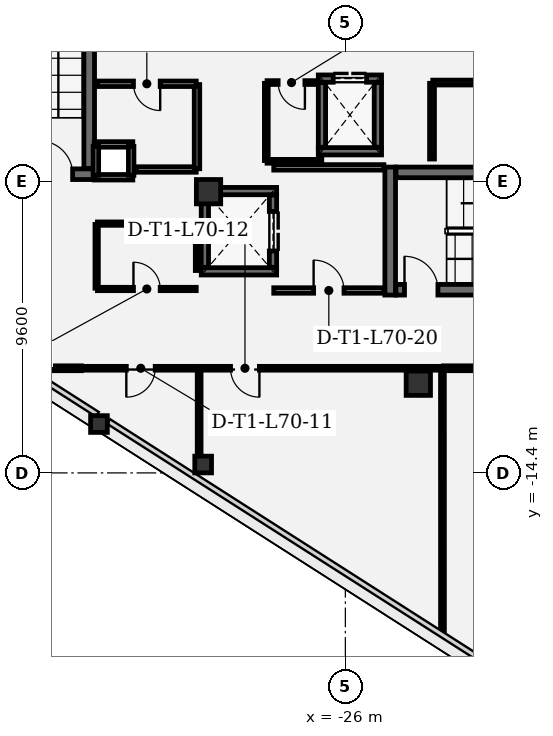
"""IFC4 building model, lengths in metres.
Left out: names, types, materials, properties, quantities, classifications, styles, units other than length and angle.
Written with IfcOpenShell. Run it as: python <this file> out.ifc"""

import sys

from ifc_helpers import new_model, si_unit, direction, frame, frame_2d, origin, origin_2d, place, context, subcontext, project, spatial, rectangle, extrude, element, fill, save


model = new_model("IFC4")
c1 = context("Model", 3, precision=1e-05, world=origin(), true_north=direction((0.0, 1.0)))
c2 = subcontext(c1, "Body", "Model", "MODEL_VIEW")
j1 = project(units=[si_unit("LENGTHUNIT", "METRE"), si_unit("PLANEANGLEUNIT", "RADIAN")], contexts=[c1])
p1 = place(None, origin())
s1 = spatial("IfcSite", under=j1, at=p1, CompositionType="ELEMENT")
p2 = place(p1, origin())
s2 = spatial("IfcBuilding", under=s1, at=p2, CompositionType="ELEMENT")
p3 = place(p2, frame((0.0, 0.0, 301.8)))
s3 = spatial("IfcBuildingStorey", under=s2, at=p3, CompositionType="ELEMENT", Elevation=301.8)
for number, where, z_axis, x_axis in (
    (1, (-23.6, -11.45, 0.0), (0.0, 0.0, 1.0), (1.0, 0.0, 0.0)),
    (2, (-30.5, -5.15, 0.0), (0.0, 0.0, 1.0), (1.0, 0.0, 0.0)),
):
    element("IfcColumn", number, at=place(p3, frame(where, z_axis=z_axis, x_axis=x_axis)), inside=s3, PredefinedType="COLUMN", context=c2, shape_type="SweptSolid", body=[
        extrude(rectangle(XDim=0.8, YDim=0.8, at=origin_2d()), origin(), (0.0, 0.0, 1.0), 4.2),
    ])
for number, where, z_axis, x_axis in (
    (3, (-34.104, -12.792, 0.0), (0.0, 0.0, 1.0), (1.0, 0.0, 0.0)),
    (4, (-30.677, -14.124, 0.0), (0.0, 0.0, 1.0), (1.0, 0.0, 0.0)),
):
    element("IfcColumn", number, at=place(p3, frame(where, z_axis=z_axis, x_axis=x_axis)), inside=s3, PredefinedType="COLUMN", context=c2, shape_type="SweptSolid", body=[
        extrude(rectangle(XDim=0.55, YDim=0.55, at=origin_2d()), origin(), (0.0, 0.0, 1.0), 4.2),
    ])
p4 = place(p3, frame((-24.525, -4.34, 0.0), z_axis=(0.0, 0.0, 1.0), x_axis=(0.0, -1.0, 0.0)))
e5 = element("IfcWall", 5, at=p4, inside=s3, PredefinedType="SHEAR", context=c2, shape_type="SweptSolid", body=[
    extrude(rectangle(XDim=4.21, YDim=0.35, at=frame_2d((2.105, 0.0))), origin(), (0.0, 0.0, 1.0), 3.91),
])
p5 = place(p3, frame((-24.335, -8.375, 0.0), z_axis=(0.0, 0.0, 1.0), x_axis=(1.0, 0.0, 0.0)))
e6 = element("IfcWall", 6, at=p5, inside=s3, PredefinedType="SHEAR", context=c2, shape_type="SweptSolid", body=[
    extrude(rectangle(XDim=8.12, YDim=0.35, at=frame_2d((4.06, 0.0))), origin(), (0.0, 0.0, 1.0), 3.91),
])
p6 = place(p5, frame((0.28, 0.0, 0.0)))
e7 = element("IfcOpeningElement", 7, at=p6, cuts=e6, PredefinedType="OPENING", context=c2, shape_type="SweptSolid", body=[
    extrude(rectangle(XDim=1.1, YDim=2.2, at=frame_2d((0.55, 1.1))), frame((0.0, 0.185, 0.0), z_axis=(0.0, -1.0, 0.0), x_axis=(1.0, 0.0, 0.0)), (0.0, 0.0, 1.0), 0.37),
])
p7 = place(p3, frame((-16.215, -4.515, 0.0), z_axis=(0.0, 0.0, 1.0), x_axis=(-1.0, 0.0, 0.0)))
e8 = element("IfcWall", 8, at=p7, inside=s3, PredefinedType="SHEAR", context=c2, shape_type="SweptSolid", body=[
    extrude(rectangle(XDim=8.12, YDim=0.35, at=frame_2d((4.06, 0.0))), origin(), (0.0, 0.0, 1.0), 3.91),
])
p8 = place(p3, frame((-38.46, -4.575, 0.0), z_axis=(0.0, 0.0, 1.0), x_axis=(1.0, 0.0, 0.0)))
e9 = element("IfcWall", 9, at=p8, inside=s3, PredefinedType="SHEAR", context=c2, shape_type="SweptSolid", body=[
    extrude(rectangle(XDim=4.21, YDim=0.35, at=frame_2d((2.105, 0.0))), origin(), (0.0, 0.0, 1.0), 3.91),
])
p9 = place(p8, frame((2.39, 0.0, 0.0)))
e10 = element("IfcOpeningElement", 10, at=p9, cuts=e9, PredefinedType="OPENING", context=c2, shape_type="SweptSolid", body=[
    extrude(rectangle(XDim=1.1, YDim=2.2, at=frame_2d((0.55, 1.1))), frame((0.0, 0.185, 0.0), z_axis=(0.0, -1.0, 0.0), x_axis=(1.0, 0.0, 0.0)), (0.0, 0.0, 1.0), 0.37),
])
p10 = place(p3, frame((-34.425, -4.385, 0.0), z_axis=(0.0, 0.0, 1.0), x_axis=(0.0, 1.0, 0.0)))
e11 = element("IfcWall", 11, at=p10, inside=s3, PredefinedType="SHEAR", context=c2, shape_type="SweptSolid", body=[
    extrude(rectangle(XDim=8.77, YDim=0.35, at=frame_2d((4.385, 0.0))), origin(), (0.0, 0.0, 1.0), 3.91),
])
for number, where, z_axis, x_axis in (
    (12, (-28.26, -7.77, 0.0), (0.0, 0.0, 1.0), (-1.0, 0.0, 0.0)),
    (13, (-30.74, -5.13, 0.0), (0.0, 0.0, 1.0), (1.0, 0.0, 0.0)),
):
    element("IfcWall", number, at=place(p3, frame(where, z_axis=z_axis, x_axis=x_axis)), inside=s3, PredefinedType="SHEAR", context=c2, shape_type="SweptSolid", body=[
        extrude(rectangle(XDim=2.48, YDim=0.24, at=frame_2d((1.24, 0.0))), origin(), (0.0, 0.0, 1.0), 3.91),
    ])
p11 = place(p3, frame((-30.62, -7.638, 0.0), z_axis=(0.0, 0.0, 1.0), x_axis=(0.0, 1.0, 0.0)))
e14 = element("IfcWall", 14, at=p11, inside=s3, PredefinedType="SHEAR", context=c2, shape_type="SweptSolid", body=[
    extrude(rectangle(XDim=2.376, YDim=0.24, at=frame_2d((1.188, 0.0))), origin(), (0.0, 0.0, 1.0), 3.91),
])
p12 = place(p3, frame((-28.38, -5.262, 0.0), z_axis=(0.0, 0.0, 1.0), x_axis=(0.0, -1.0, 0.0)))
e15 = element("IfcWall", 15, at=p12, inside=s3, PredefinedType="SHEAR", context=c2, shape_type="SweptSolid", body=[
    extrude(rectangle(XDim=2.376, YDim=0.24, at=frame_2d((1.188, 0.0))), origin(), (0.0, 0.0, 1.0), 3.91),
])
p13 = place(p12, frame((0.538, 0.0, 0.0)))
e16 = element("IfcOpeningElement", 16, at=p13, cuts=e15, PredefinedType="OPENING", context=c2, shape_type="SweptSolid", body=[
    extrude(rectangle(XDim=1.3, YDim=2.3, at=frame_2d((0.65, 1.15))), frame((0.0, 0.13, 0.0), z_axis=(0.0, -1.0, 0.0), x_axis=(1.0, 0.0, 0.0)), (0.0, 0.0, 1.0), 0.26),
])
p14 = place(p3, frame((-24.81, -3.82, 0.0), z_axis=(0.0, 0.0, 1.0), x_axis=(-1.0, 0.0, 0.0)))
e17 = element("IfcWall", 17, at=p14, inside=s3, PredefinedType="SHEAR", context=c2, shape_type="SweptSolid", body=[
    extrude(rectangle(XDim=2.08, YDim=0.24, at=frame_2d((1.04, 0.0))), origin(), (0.0, 0.0, 1.0), 3.91),
])
p15 = place(p3, frame((-26.89, -1.43, 0.0), z_axis=(0.0, 0.0, 1.0), x_axis=(1.0, 0.0, 0.0)))
e18 = element("IfcWall", 18, at=p15, inside=s3, PredefinedType="SHEAR", context=c2, shape_type="SweptSolid", body=[
    extrude(rectangle(XDim=2.08, YDim=0.24, at=frame_2d((1.04, 0.0))), origin(), (0.0, 0.0, 1.0), 3.91),
])
p16 = place(p15, frame((0.49, 0.0, 0.0)))
e19 = element("IfcOpeningElement", 19, at=p16, cuts=e18, PredefinedType="OPENING", context=c2, shape_type="SweptSolid", body=[
    extrude(rectangle(XDim=1.1, YDim=2.2, at=frame_2d((0.55, 1.1))), frame((0.0, 0.13, 0.0), z_axis=(0.0, -1.0, 0.0), x_axis=(1.0, 0.0, 0.0)), (0.0, 0.0, 1.0), 0.26),
])
for number, where, z_axis, x_axis in (
    (20, (-26.77, -3.688, 0.0), (0.0, 0.0, 1.0), (0.0, 1.0, 0.0)),
    (21, (-24.93, -1.562, 0.0), (0.0, 0.0, 1.0), (0.0, -1.0, 0.0)),
):
    element("IfcWall", number, at=place(p3, frame(where, z_axis=z_axis, x_axis=x_axis)), inside=s3, PredefinedType="SHEAR", context=c2, shape_type="SweptSolid", body=[
        extrude(rectangle(XDim=2.126, YDim=0.24, at=frame_2d((1.063, 0.0))), origin(), (0.0, 0.0, 1.0), 3.91),
    ])
for number, where, z_axis, x_axis in (
    (22, (-32.99, -4.675, 0.0), (0.0, 0.0, 1.0), (-1.0, 0.0, 0.0)),
    (23, (-34.26, -3.595, 0.0), (0.0, 0.0, 1.0), (1.0, 0.0, 0.0)),
):
    element("IfcWall", number, at=place(p3, frame(where, z_axis=z_axis, x_axis=x_axis)), inside=s3, PredefinedType="PARTITIONING", context=c2, shape_type="SweptSolid", body=[
        extrude(rectangle(XDim=1.27, YDim=0.18, at=frame_2d((0.635, 0.0))), origin(), (0.0, 0.0, 1.0), 3.91),
    ])
for number, where, z_axis, x_axis in (
    (24, (-34.205, -4.61, 0.0), (0.0, 0.0, 1.0), (0.0, 1.0, 0.0)),
    (25, (-33.045, -3.66, 0.0), (0.0, 0.0, 1.0), (0.0, -1.0, 0.0)),
):
    element("IfcWall", number, at=place(p3, frame(where, z_axis=z_axis, x_axis=x_axis)), inside=s3, PredefinedType="PARTITIONING", context=c2, shape_type="SweptSolid", body=[
        extrude(rectangle(XDim=0.95, YDim=0.18, at=frame_2d((0.475, 0.0))), origin(), (0.0, 0.0, 1.0), 3.91),
    ])
p17 = place(p3, frame((-28.355, -8.4, 0.0), z_axis=(0.0, 0.0, 1.0), x_axis=(1.0, 0.0, 0.0)))
e26 = element("IfcWall", 26, at=p17, inside=s3, PredefinedType="PARTITIONING", context=c2, shape_type="SweptSolid", body=[
    extrude(rectangle(XDim=3.622, YDim=0.18, at=frame_2d((1.811, 0.0))), origin(), (0.0, 0.0, 1.0), 3.529),
])
p18 = place(p17, frame((1.311, 0.0, 0.0)))
e27 = element("IfcOpeningElement", 27, at=p18, cuts=e26, PredefinedType="OPENING", context=c2, shape_type="SweptSolid", body=[
    extrude(rectangle(XDim=1.0, YDim=2.15, at=frame_2d((0.5, 1.075))), frame((0.0, 0.1, 0.0), z_axis=(0.0, -1.0, 0.0), x_axis=(1.0, 0.0, 0.0)), (0.0, 0.0, 1.0), 0.2),
])
p19 = place(p3, frame((-24.733, -4.35, 0.0), z_axis=(0.0, 0.0, 1.0), x_axis=(-1.0, 0.0, 0.0)))
e28 = element("IfcWall", 28, at=p19, inside=s3, PredefinedType="PARTITIONING", context=c2, shape_type="SweptSolid", body=[
    extrude(rectangle(XDim=3.622, YDim=0.18, at=frame_2d((1.811, 0.0))), origin(), (0.0, 0.0, 1.0), 3.91),
])
p20 = place(p3, frame((-34.18, -6.225, 0.0), z_axis=(0.0, 0.0, 1.0), x_axis=(0.0, -1.0, 0.0)))
e29 = element("IfcWall", 29, at=p20, inside=s3, PredefinedType="PARTITIONING", context=c2, shape_type="SweptSolid", body=[
    extrude(rectangle(XDim=2.1, YDim=0.11, at=frame_2d((1.05, 0.0))), origin(), (0.0, 0.0, 1.0), 3.91),
])
p21 = place(p3, frame((-34.155, -8.35, 0.0), z_axis=(0.0, 0.0, 1.0), x_axis=(1.0, 0.0, 0.0)))
e30 = element("IfcWall", 30, at=p21, inside=s3, PredefinedType="PARTITIONING", context=c2, shape_type="SweptSolid", body=[
    extrude(rectangle(XDim=3.25, YDim=0.11, at=frame_2d((1.625, 0.0))), origin(), (0.0, 0.0, 1.0), 3.13),
])
p22 = place(p21, frame((1.185, 0.0, 0.0)))
e31 = element("IfcOpeningElement", 31, at=p22, cuts=e30, PredefinedType="OPENING", context=c2, shape_type="SweptSolid", body=[
    extrude(rectangle(XDim=0.88, YDim=2.1, at=frame_2d((0.44, 1.05))), frame((0.0, 0.065, 0.0), z_axis=(0.0, -1.0, 0.0), x_axis=(1.0, 0.0, 0.0)), (0.0, 0.0, 1.0), 0.13),
])
p23 = place(p3, frame((-30.88, -7.743, 0.0), z_axis=(0.0, 0.0, 1.0), x_axis=(0.0, 1.0, 0.0)))
e32 = element("IfcWall", 32, at=p23, inside=s3, PredefinedType="PARTITIONING", context=c2, shape_type="SweptSolid", body=[
    extrude(rectangle(XDim=1.518, YDim=0.11, at=frame_2d((0.759, 0.0))), origin(), (0.0, 0.0, 1.0), 3.91),
])
p24 = place(p3, frame((-30.905, -6.2, 0.0), z_axis=(0.0, 0.0, 1.0), x_axis=(-1.0, 0.0, 0.0)))
e33 = element("IfcWall", 33, at=p24, inside=s3, PredefinedType="PARTITIONING", context=c2, shape_type="SweptSolid", body=[
    extrude(rectangle(XDim=3.25, YDim=0.11, at=frame_2d((1.625, 0.0))), origin(), (0.0, 0.0, 1.0), 3.529),
])
p25 = place(p3, frame((-23.15, -1.585, 0.0), z_axis=(0.0, 0.0, 1.0), x_axis=(0.0, -1.0, 0.0)))
e34 = element("IfcWall", 34, at=p25, inside=s3, PredefinedType="PARTITIONING", context=c2, shape_type="SweptSolid", body=[
    extrude(rectangle(XDim=2.49, YDim=0.16, at=frame_2d((1.245, 0.0))), origin(), (0.0, 0.0, 1.0), 3.91),
])
p26 = place(p3, frame((-16.025, -1.56, 0.0), z_axis=(0.0, 0.0, 1.0), x_axis=(-1.0, 0.0, 0.0)))
e35 = element("IfcWall", 35, at=p26, inside=s3, PredefinedType="PARTITIONING", context=c2, shape_type="SweptSolid", body=[
    extrude(rectangle(XDim=7.1, YDim=0.16, at=frame_2d((3.55, 0.0))), origin(), (0.0, 0.0, 1.0), 3.91),
])
p27 = place(p26, frame((3.0, 0.0, 0.0)))
e36 = element("IfcOpeningElement", 36, at=p27, cuts=e35, PredefinedType="OPENING", context=c2, shape_type="SweptSolid", body=[
    extrude(rectangle(XDim=1.1, YDim=2.15, at=frame_2d((0.55, 1.075))), frame((0.0, 0.09, 0.0), z_axis=(0.0, -1.0, 0.0), x_axis=(1.0, 0.0, 0.0)), (0.0, 0.0, 1.0), 0.18),
])
p28 = place(p3, frame((-28.6, -1.585, 0.0), z_axis=(0.0, 0.0, 1.0), x_axis=(0.0, -1.0, 0.0)))
e37 = element("IfcWall", 37, at=p28, inside=s3, PredefinedType="PARTITIONING", context=c2, shape_type="SweptSolid", body=[
    extrude(rectangle(XDim=2.54, YDim=0.125, at=frame_2d((1.27, 0.0))), origin(), (0.0, 0.0, 1.0), 3.91),
])
p29 = place(p3, frame((-28.575, -4.15, 0.0), z_axis=(0.0, 0.0, 1.0), x_axis=(1.0, 0.0, 0.0)))
e38 = element("IfcWall", 38, at=p29, inside=s3, PredefinedType="PARTITIONING", context=c2, shape_type="SweptSolid", body=[
    extrude(rectangle(XDim=1.8, YDim=0.125, at=frame_2d((0.9, 0.0))), origin(), (0.0, 0.0, 1.0), 3.91),
])
p30 = place(p3, frame((-26.966, -1.56, 0.0), z_axis=(0.0, 0.0, 1.0), x_axis=(-1.0, 0.0, 0.0)))
e39 = element("IfcWall", 39, at=p30, inside=s3, PredefinedType="PARTITIONING", context=c2, shape_type="SweptSolid", body=[
    extrude(rectangle(XDim=1.609, YDim=0.125, at=frame_2d((0.805, 0.0))), origin(), (0.0, 0.0, 1.0), 3.91),
])
p31 = place(p30, frame((0.365, 0.0, 0.0)))
e40 = element("IfcOpeningElement", 40, at=p31, cuts=e39, PredefinedType="OPENING", context=c2, shape_type="SweptSolid", body=[
    extrude(rectangle(XDim=0.88, YDim=2.1, at=frame_2d((0.44, 1.05))), frame((0.0, 0.073, 0.0), z_axis=(0.0, -1.0, 0.0), x_axis=(1.0, 0.0, 0.0)), (0.0, 0.0, 1.0), 0.145),
])
p32 = place(p3, frame((-32.88, -4.42, 0.0), z_axis=(0.0, 0.0, 1.0), x_axis=(1.0, 0.0, 0.0)))
e41 = element("IfcWall", 41, at=p32, inside=s3, PredefinedType="PARTITIONING", context=c2, shape_type="SweptSolid", body=[
    extrude(rectangle(XDim=1.975, YDim=0.18, at=frame_2d((0.988, 0.0))), origin(), (0.0, 0.0, 1.0), 3.91),
])
p33 = place(p3, frame((-30.88, -4.395, 0.0), z_axis=(0.0, 0.0, 1.0), x_axis=(0.0, 1.0, 0.0)))
e42 = element("IfcWall", 42, at=p33, inside=s3, PredefinedType="PARTITIONING", context=c2, shape_type="SweptSolid", body=[
    extrude(rectangle(XDim=2.77, YDim=0.18, at=frame_2d((1.385, 0.0))), origin(), (0.0, 0.0, 1.0), 3.91),
])
p34 = place(p3, frame((-30.905, -1.6, 0.0), z_axis=(0.0, 0.0, 1.0), x_axis=(-1.0, 0.0, 0.0)))
e43 = element("IfcWall", 43, at=p34, inside=s3, PredefinedType="PARTITIONING", context=c2, shape_type="SweptSolid", body=[
    extrude(rectangle(XDim=3.25, YDim=0.18, at=frame_2d((1.625, 0.0))), origin(), (0.0, 0.0, 1.0), 3.91),
])
p35 = place(p34, frame((1.185, 0.0, 0.0)))
e44 = element("IfcOpeningElement", 44, at=p35, cuts=e43, PredefinedType="OPENING", context=c2, shape_type="SweptSolid", body=[
    extrude(rectangle(XDim=0.88, YDim=2.1, at=frame_2d((0.44, 1.05))), frame((0.0, 0.1, 0.0), z_axis=(0.0, -1.0, 0.0), x_axis=(1.0, 0.0, 0.0)), (0.0, 0.0, 1.0), 0.2),
])
p36 = place(p3, frame((-30.809, -13.784, 0.0), z_axis=(0.0, 0.0, 1.0), x_axis=(0.0, 1.0, 0.0)))
e45 = element("IfcWall", 45, at=p36, inside=s3, PredefinedType="PARTITIONING", context=c2, shape_type="SweptSolid", body=[
    extrude(rectangle(XDim=2.801, YDim=0.125, at=frame_2d((1.401, 0.0))), origin(), (0.0, 0.0, 1.0), 3.91),
])
p37 = place(p3, frame((-30.834, -10.958, 0.0), z_axis=(0.0, 0.0, 1.0), x_axis=(-1.0, 0.0, 0.0)))
e46 = element("IfcWall", 46, at=p37, inside=s3, PredefinedType="PARTITIONING", context=c2, shape_type="SweptSolid", body=[
    extrude(rectangle(XDim=3.791, YDim=0.125, at=frame_2d((1.896, 0.0))), origin(), (0.0, 0.0, 1.0), 3.91),
])
p38 = place(p37, frame((1.42, 0.0, 0.0)))
e47 = element("IfcOpeningElement", 47, at=p38, cuts=e46, PredefinedType="OPENING", context=c2, shape_type="SweptSolid", body=[
    extrude(rectangle(XDim=0.95, YDim=2.15, at=frame_2d((0.475, 1.075))), frame((0.0, 0.073, 0.0), z_axis=(0.0, -1.0, 0.0), x_axis=(1.0, 0.0, 0.0)), (0.0, 0.0, 1.0), 0.145),
])
p39 = place(p3, frame((-22.832, -10.958, 0.0), z_axis=(0.0, 0.0, 1.0), x_axis=(-1.0, 0.0, 0.0)))
e48 = element("IfcWall", 48, at=p39, inside=s3, PredefinedType="PARTITIONING", context=c2, shape_type="SweptSolid", body=[
    extrude(rectangle(XDim=7.944, YDim=0.125, at=frame_2d((3.972, 0.0))), origin(), (0.0, 0.0, 1.0), 3.13),
])
p40 = place(p39, frame((5.995, 0.0, 0.0)))
e49 = element("IfcOpeningElement", 49, at=p40, cuts=e48, PredefinedType="OPENING", context=c2, shape_type="SweptSolid", body=[
    extrude(rectangle(XDim=0.95, YDim=2.15, at=frame_2d((0.475, 1.075))), frame((0.0, 0.073, 0.0), z_axis=(0.0, -1.0, 0.0), x_axis=(1.0, 0.0, 0.0)), (0.0, 0.0, 1.0), 0.145),
])
p41 = place(p3, frame((-22.805, -19.648, 0.0), z_axis=(0.0, 0.0, 1.0), x_axis=(-0.000169052178, 0.999999985711, 0.0)))
e50 = element("IfcWall", 50, at=p41, inside=s3, PredefinedType="PARTITIONING", context=c2, shape_type="SweptSolid", body=[
    extrude(rectangle(XDim=8.665, YDim=0.125, at=frame_2d((4.333, 0.0))), origin(), (0.0, 0.0, 1.0), 3.91),
])
p42 = place(p3, frame((-16.459, -10.958, 0.0), z_axis=(0.0, 0.0, 1.0), x_axis=(-1.0, 0.0, 0.0)))
e51 = element("IfcWall", 51, at=p42, inside=s3, PredefinedType="PARTITIONING", context=c2, shape_type="SweptSolid", body=[
    extrude(rectangle(XDim=6.315, YDim=0.16, at=frame_2d((3.157, 0.0))), origin(), (0.0, 0.0, 1.0), 3.529),
])
p43 = place(p42, frame((2.607, 0.0, 0.0)))
e52 = element("IfcOpeningElement", 52, at=p43, cuts=e51, PredefinedType="OPENING", context=c2, shape_type="SweptSolid", body=[
    extrude(rectangle(XDim=1.1, YDim=2.15, at=frame_2d((0.55, 1.075))), frame((0.0, 0.09, 0.0), z_axis=(0.0, -1.0, 0.0), x_axis=(1.0, 0.0, 0.0)), (0.0, 0.0, 1.0), 0.18),
])
p44 = place(p3, frame((-36.447, -10.958, 0.0), z_axis=(0.0, 0.0, 1.0), x_axis=(1.0, 0.0, 0.0)))
e53 = element("IfcWall", 53, at=p44, inside=s3, PredefinedType="PARTITIONING", context=c2, shape_type="SweptSolid", body=[
    extrude(rectangle(XDim=1.764, YDim=0.16, at=frame_2d((0.882, 0.0))), origin(), (0.0, 0.0, 1.0), 3.91),
])
p45 = place(p6, origin())
e54 = element("IfcDoor", 54, at=p45, inside=s3, OperationType="SINGLE_SWING_LEFT", PredefinedType="DOOR", context=c2, shape_type="SweptSolid", body=[
    extrude(rectangle(XDim=1.1, YDim=2.2, at=frame_2d((0.55, 1.1))), frame((0.0, 0.025, 0.0), z_axis=(0.0, -1.0, 0.0), x_axis=(1.0, 0.0, 0.0)), (0.0, 0.0, 1.0), 0.05),
])
fill(e7, e54)
p46 = place(p9, origin())
e55 = element("IfcDoor", 55, at=p46, inside=s3, OperationType="SINGLE_SWING_LEFT", PredefinedType="DOOR", context=c2, shape_type="SweptSolid", body=[
    extrude(rectangle(XDim=1.1, YDim=2.2, at=frame_2d((0.55, 1.1))), frame((0.0, 0.025, 0.0), z_axis=(0.0, -1.0, 0.0), x_axis=(1.0, 0.0, 0.0)), (0.0, 0.0, 1.0), 0.05),
])
fill(e10, e55)
p47 = place(p13, origin())
e56 = element("IfcDoor", 56, at=p47, inside=s3, OperationType="DOUBLE_DOOR_SLIDING", PredefinedType="DOOR", context=c2, shape_type="SweptSolid", body=[
    extrude(rectangle(XDim=1.3, YDim=2.3, at=frame_2d((0.65, 1.15))), frame((0.0, 0.025, 0.0), z_axis=(0.0, -1.0, 0.0), x_axis=(1.0, 0.0, 0.0)), (0.0, 0.0, 1.0), 0.05),
])
fill(e16, e56)
p48 = place(p16, origin())
e57 = element("IfcDoor", 57, at=p48, inside=s3, OperationType="DOUBLE_DOOR_SLIDING", PredefinedType="DOOR", context=c2, shape_type="SweptSolid", body=[
    extrude(rectangle(XDim=1.1, YDim=2.2, at=frame_2d((0.55, 1.1))), frame((0.0, 0.025, 0.0), z_axis=(0.0, -1.0, 0.0), x_axis=(1.0, 0.0, 0.0)), (0.0, 0.0, 1.0), 0.05),
])
fill(e19, e57)
p49 = place(p31, origin())
e58 = element("IfcDoor", 58, at=p49, inside=s3, OperationType="SINGLE_SWING_LEFT", PredefinedType="DOOR", context=c2, shape_type="SweptSolid", body=[
    extrude(rectangle(XDim=0.88, YDim=2.1, at=frame_2d((0.44, 1.05))), frame((0.0, 0.025, 0.0), z_axis=(0.0, -1.0, 0.0), x_axis=(1.0, 0.0, 0.0)), (0.0, 0.0, 1.0), 0.05),
])
fill(e40, e58)
p50 = place(p35, origin())
e59 = element("IfcDoor", 59, at=p50, inside=s3, OperationType="SINGLE_SWING_LEFT", PredefinedType="DOOR", context=c2, shape_type="SweptSolid", body=[
    extrude(rectangle(XDim=0.88, YDim=2.1, at=frame_2d((0.44, 1.05))), frame((0.0, 0.025, 0.0), z_axis=(0.0, -1.0, 0.0), x_axis=(1.0, 0.0, 0.0)), (0.0, 0.0, 1.0), 0.05),
])
fill(e44, e59)
p51 = place(p38, origin())
e60 = element("IfcDoor", 60, at=p51, inside=s3, OperationType="SINGLE_SWING_RIGHT", PredefinedType="DOOR", context=c2, shape_type="SweptSolid", body=[
    extrude(rectangle(XDim=0.95, YDim=2.15, at=frame_2d((0.475, 1.075))), frame((0.0, 0.025, 0.0), z_axis=(0.0, -1.0, 0.0), x_axis=(1.0, 0.0, 0.0)), (0.0, 0.0, 1.0), 0.05),
])
fill(e47, e60)
p52 = place(p40, origin())
e61 = element("IfcDoor", 61, at=p52, inside=s3, OperationType="SINGLE_SWING_LEFT", PredefinedType="DOOR", context=c2, shape_type="SweptSolid", body=[
    extrude(rectangle(XDim=0.95, YDim=2.15, at=frame_2d((0.475, 1.075))), frame((0.0, 0.025, 0.0), z_axis=(0.0, -1.0, 0.0), x_axis=(1.0, 0.0, 0.0)), (0.0, 0.0, 1.0), 0.05),
])
fill(e49, e61)
p53 = place(p18, origin())
e62 = element("IfcDoor", 62, at=p53, inside=s3, OperationType="SINGLE_SWING_LEFT", PredefinedType="DOOR", context=c2, shape_type="SweptSolid", body=[
    extrude(rectangle(XDim=1.0, YDim=2.15, at=frame_2d((0.5, 1.075))), frame((0.0, 0.025, 0.0), z_axis=(0.0, -1.0, 0.0), x_axis=(1.0, 0.0, 0.0)), (0.0, 0.0, 1.0), 0.05),
])
fill(e27, e62)
p54 = place(p22, origin())
e63 = element("IfcDoor", 63, at=p54, inside=s3, OperationType="SINGLE_SWING_LEFT", PredefinedType="DOOR", context=c2, shape_type="SweptSolid", body=[
    extrude(rectangle(XDim=0.88, YDim=2.1, at=frame_2d((0.44, 1.05))), frame((0.0, 0.025, 0.0), z_axis=(0.0, -1.0, 0.0), x_axis=(1.0, 0.0, 0.0)), (0.0, 0.0, 1.0), 0.05),
])
fill(e31, e63)
save(model, sys.argv[1])
